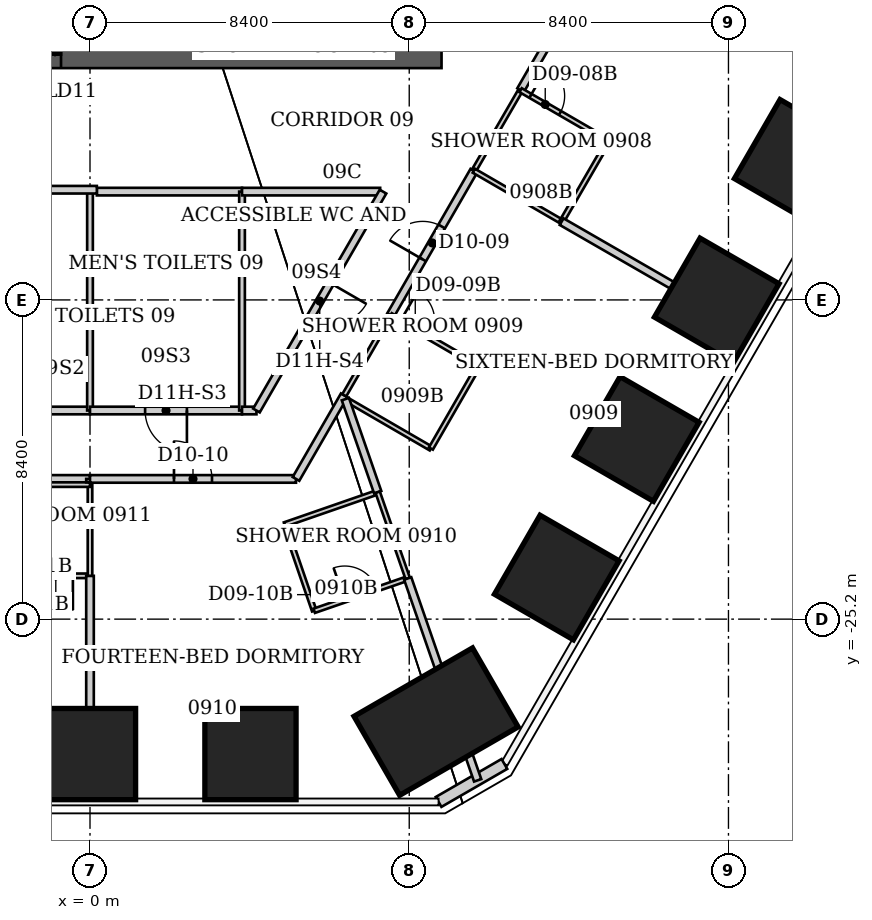
"""IFC4 building model, lengths in metres.
Left out: names, types, materials, properties, quantities, classifications, styles, units other than length and angle.
Written with IfcOpenShell. Run it as: python <this file> out.ifc"""

import sys

from ifc_helpers import new_model, si_unit, direction, frame, frame_2d, origin, origin_2d, place, context, subcontext, project, spatial, rectangle, extrude, element, fill, save


model = new_model("IFC4")
c1 = context("Model", 3, precision=1e-05, world=origin(), true_north=direction((0.0, 1.0)))
c2 = subcontext(c1, "Body", "Model", "MODEL_VIEW")
j1 = project(units=[si_unit("LENGTHUNIT", "METRE"), si_unit("PLANEANGLEUNIT", "RADIAN")], contexts=[c1])
p1 = place(None, origin())
s1 = spatial("IfcSite", under=j1, at=p1, CompositionType="ELEMENT")
p2 = place(p1, origin())
s2 = spatial("IfcBuilding", under=s1, at=p2, CompositionType="ELEMENT")
p3 = place(p2, frame((0.0, 0.0, 42.0)))
s3 = spatial("IfcBuildingStorey", under=s2, at=p3, CompositionType="ELEMENT", Elevation=42.0)
for number, where, z_axis, x_axis in (
    (1, (18.596, -13.167, 0.0), (0.0, 0.0, 1.0), (0.866, -0.5, 0.0)),
    (2, (16.491, -16.813, 0.0), (0.0, 0.0, 1.0), (0.866, -0.5, 0.0)),
    (3, (14.387, -20.459, 0.0), (0.0, 0.0, 1.0), (0.866, -0.5, 0.0)),
    (4, (12.282, -24.105, 0.0), (0.0, 0.0, 1.0), (0.866, -0.5, 0.0)),
):
    element("IfcColumn", number, at=place(p3, frame(where, z_axis=z_axis, x_axis=x_axis)), inside=s3, PredefinedType="COLUMN", context=c2, shape_type="SweptSolid", body=[
        extrude(rectangle(XDim=2.4, YDim=2.4, at=origin_2d()), origin(), (0.0, 0.0, 1.0), 3.8),
    ])
p4 = place(p3, frame((9.106, -27.897, 0.0), z_axis=(0.0, 0.0, 1.0), x_axis=(0.5, -0.866025403784, 0.0)))
e5 = element("IfcColumn", 5, at=p4, inside=s3, PredefinedType="COLUMN", context=c2, shape_type="SweptSolid", body=[
    extrude(rectangle(XDim=2.4, YDim=3.6, at=origin_2d()), origin(), (0.0, 0.0, 1.0), 3.8),
])
for number, where, z_axis, x_axis in (
    (6, (4.222, -28.751, 0.0), (0.0, 0.0, 1.0), (0.0, -1.0, 0.0)),
    (7, (0.0, -28.751, 0.0), (0.0, 0.0, 1.0), (0.0, -1.0, 0.0)),
):
    element("IfcColumn", number, at=place(p3, frame(where, z_axis=z_axis, x_axis=x_axis)), inside=s3, PredefinedType="COLUMN", context=c2, shape_type="SweptSolid", body=[
        extrude(rectangle(XDim=2.4, YDim=2.4, at=origin_2d()), origin(), (0.0, 0.0, 1.0), 3.8),
    ])
p5 = place(p3, frame((-9.25, -9.95, 0.0), z_axis=(0.0, 0.0, 1.0), x_axis=(1.0, 0.0, 0.0)))
e8 = element("IfcWall", 8, at=p5, inside=s3, PredefinedType="SHEAR", context=c2, shape_type="SweptSolid", body=[
    extrude(rectangle(XDim=18.5, YDim=1.5, at=frame_2d((9.25, 0.0))), origin(), (0.0, 0.0, 1.0), 3.8),
])
p6 = place(p5, frame((2.137, 0.0, 0.0)))
e9 = element("IfcOpeningElement", 9, at=p6, cuts=e8, PredefinedType="OPENING", context=c2, shape_type="SweptSolid", body=[
    extrude(rectangle(XDim=1.1, YDim=2.1, at=frame_2d((0.55, 1.05))), frame((0.0, 0.75, 0.0), z_axis=(0.0, -1.0, 0.0), x_axis=(1.0, 0.0, 0.0)), (0.0, 0.0, 1.0), 1.5),
])
p7 = place(p5, frame((4.762, 0.0, 0.0)))
e10 = element("IfcOpeningElement", 10, at=p7, cuts=e8, PredefinedType="OPENING", context=c2, shape_type="SweptSolid", body=[
    extrude(rectangle(XDim=1.1, YDim=2.1, at=frame_2d((0.55, 1.05))), frame((0.0, 0.75, 0.0), z_axis=(0.0, -1.0, 0.0), x_axis=(1.0, 0.0, 0.0)), (0.0, 0.0, 1.0), 1.5),
])
p8 = place(p5, frame((7.387, 0.0, 0.0)))
e11 = element("IfcOpeningElement", 11, at=p8, cuts=e8, PredefinedType="OPENING", context=c2, shape_type="SweptSolid", body=[
    extrude(rectangle(XDim=1.1, YDim=2.1, at=frame_2d((0.55, 1.05))), frame((0.0, 0.75, 0.0), z_axis=(0.0, -1.0, 0.0), x_axis=(1.0, 0.0, 0.0)), (0.0, 0.0, 1.0), 1.5),
])
p9 = place(p3, frame((10.904, -29.011, 0.0), z_axis=(0.0, 0.0, 1.0), x_axis=(-0.866010750942, -0.50002537861, 0.0)))
e12 = element("IfcWall", 12, at=p9, inside=s3, PredefinedType="SOLIDWALL", context=c2, shape_type="SweptSolid", body=[
    extrude(rectangle(XDim=2.0, YDim=0.3, at=frame_2d((1.0, 0.0))), origin(), (0.0, 0.0, 1.0), 3.64),
])
p10 = place(p3, frame((-5.42, -21.51, 0.0), z_axis=(0.0, 0.0, 1.0), x_axis=(1.0, 0.0, 0.0)))
e13 = element("IfcWall", 13, at=p10, inside=s3, PredefinedType="PARTITIONING", context=c2, shape_type="SweptSolid", body=[
    extrude(rectangle(XDim=5.42, YDim=0.2, at=frame_2d((2.71, 0.0))), origin(), (0.0, 0.0, 1.0), 3.64),
])
p11 = place(p10, frame((1.71, 0.0, 0.0)))
e14 = element("IfcOpeningElement", 14, at=p11, cuts=e13, PredefinedType="OPENING", context=c2, shape_type="SweptSolid", body=[
    extrude(rectangle(XDim=1.0, YDim=2.13, at=frame_2d((0.5, 1.065))), frame((0.0, 0.1, 0.0), z_axis=(0.0, -1.0, 0.0), x_axis=(1.0, 0.0, 0.0)), (0.0, 0.0, 1.0), 0.2),
])
p12 = place(p3, frame((-2.6, -24.06, 0.0), z_axis=(0.0, 0.0, 1.0), x_axis=(1.0, 0.0, 0.0)))
e15 = element("IfcWall", 15, at=p12, inside=s3, PredefinedType="PARTITIONING", context=c2, shape_type="SweptSolid", body=[
    extrude(rectangle(XDim=2.6, YDim=0.12, at=frame_2d((1.3, 0.0))), origin(), (0.0, 0.0, 1.0), 3.64),
])
p13 = place(p12, frame((1.25, 0.0, 0.0)))
e16 = element("IfcOpeningElement", 16, at=p13, cuts=e15, PredefinedType="OPENING", context=c2, shape_type="SweptSolid", body=[
    extrude(rectangle(XDim=0.9, YDim=2.03, at=frame_2d((0.45, 1.015))), frame((0.0, 0.06, 0.0), z_axis=(0.0, -1.0, 0.0), x_axis=(1.0, 0.0, 0.0)), (0.0, 0.0, 1.0), 0.12),
])
p14 = place(p3, frame((0.0, -29.89, 0.0), z_axis=(0.0, 0.0, 1.0), x_axis=(0.0, 1.0, 0.0)))
e17 = element("IfcWall", 17, at=p14, inside=s3, PredefinedType="PARTITIONING", context=c2, shape_type="SweptSolid", body=[
    extrude(rectangle(XDim=5.83, YDim=0.2, at=frame_2d((2.915, 0.0))), origin(), (0.0, 0.0, 1.0), 2.86),
])
p15 = place(p3, frame((0.0, -24.06, 0.0), z_axis=(0.0, 0.0, 1.0), x_axis=(0.0, 1.0, 0.0)))
e18 = element("IfcWall", 18, at=p15, inside=s3, PredefinedType="PARTITIONING", context=c2, shape_type="SweptSolid", body=[
    extrude(rectangle(XDim=2.4, YDim=0.12, at=frame_2d((1.2, 0.0))), origin(), (0.0, 0.0, 1.0), 2.86),
])
p16 = place(p3, frame((0.0, -21.66, 0.0), z_axis=(0.0, 0.0, 1.0), x_axis=(-1.0, 0.0, 0.0)))
e19 = element("IfcWall", 19, at=p16, inside=s3, PredefinedType="PARTITIONING", context=c2, shape_type="SweptSolid", body=[
    extrude(rectangle(XDim=2.6, YDim=0.12, at=frame_2d((1.3, 0.0))), origin(), (0.0, 0.0, 1.0), 3.64),
])
p17 = place(p3, frame((0.0, -21.6, 0.0), z_axis=(0.0, 0.0, 1.0), x_axis=(0.0, 1.0, 0.0)))
e20 = element("IfcWall", 20, at=p17, inside=s3, PredefinedType="PARTITIONING", context=c2, shape_type="SweptSolid", body=[
    extrude(rectangle(XDim=0.09, YDim=0.2, at=frame_2d((0.045, 0.0))), origin(), (0.0, 0.0, 1.0), 3.64),
])
p18 = place(p3, frame((0.0, -21.51, 0.0), z_axis=(0.0, 0.0, 1.0), x_axis=(1.0, 0.0, 0.0)))
e21 = element("IfcWall", 21, at=p18, inside=s3, PredefinedType="PARTITIONING", context=c2, shape_type="SweptSolid", body=[
    extrude(rectangle(XDim=5.42, YDim=0.2, at=frame_2d((2.71, 0.0))), origin(), (0.0, 0.0, 1.0), 3.64),
])
p19 = place(p18, frame((2.21, 0.0, 0.0)))
e22 = element("IfcOpeningElement", 22, at=p19, cuts=e21, PredefinedType="OPENING", context=c2, shape_type="SweptSolid", body=[
    extrude(rectangle(XDim=1.0, YDim=2.13, at=frame_2d((0.5, 1.065))), frame((0.0, 0.1, 0.0), z_axis=(0.0, -1.0, 0.0), x_axis=(1.0, 0.0, 0.0)), (0.0, 0.0, 1.0), 0.2),
])
p20 = place(p3, frame((0.0, -19.71, 0.0), z_axis=(0.0, 0.0, 1.0), x_axis=(-1.0, 0.0, 0.0)))
e23 = element("IfcWall", 23, at=p20, inside=s3, PredefinedType="PARTITIONING", context=c2, shape_type="SweptSolid", body=[
    extrude(rectangle(XDim=4.0, YDim=0.2, at=frame_2d((2.0, 0.0))), origin(), (0.0, 0.0, 1.0), 3.64),
])
p21 = place(p3, frame((0.0, -13.95, 0.0), z_axis=(0.0, 0.0, 1.0), x_axis=(0.0, -1.0, 0.0)))
e24 = element("IfcWall", 24, at=p21, inside=s3, PredefinedType="PARTITIONING", context=c2, shape_type="SweptSolid", body=[
    extrude(rectangle(XDim=5.76, YDim=0.15, at=frame_2d((2.88, 0.0))), origin(), (0.0, 0.0, 1.0), 2.86),
])
p22 = place(p3, frame((0.18, -13.95, 0.0), z_axis=(0.0, 0.0, 1.0), x_axis=(1.0, 0.0, 0.0)))
e25 = element("IfcWall", 25, at=p22, inside=s3, PredefinedType="PARTITIONING", context=c2, shape_type="SweptSolid", body=[
    extrude(rectangle(XDim=3.82, YDim=0.2, at=frame_2d((1.91, 0.0))), origin(), (0.0, 0.0, 1.0), 3.64),
])
p23 = place(p3, frame((0.18, -13.9, 0.0), z_axis=(0.0, 0.0, 1.0), x_axis=(-1.0, 0.0, 0.0)))
e26 = element("IfcWall", 26, at=p23, inside=s3, PredefinedType="PARTITIONING", context=c2, shape_type="SweptSolid", body=[
    extrude(rectangle(XDim=7.97, YDim=0.2, at=frame_2d((3.985, 0.0))), origin(), (0.0, 0.0, 1.0), 3.64),
])
p24 = place(p23, frame((3.035, 0.0, 0.0)))
e27 = element("IfcOpeningElement", 27, at=p24, cuts=e26, PredefinedType="OPENING", context=c2, shape_type="SweptSolid", body=[
    extrude(rectangle(XDim=1.1, YDim=2.2, at=frame_2d((0.55, 1.1))), frame((0.0, 0.1, 0.0), z_axis=(0.0, -1.0, 0.0), x_axis=(1.0, 0.0, 0.0)), (0.0, 0.0, 1.0), 0.2),
])
p25 = place(p3, frame((4.0, -19.71, 0.0), z_axis=(0.0, 0.0, 1.0), x_axis=(-1.0, 0.0, 0.0)))
e28 = element("IfcWall", 28, at=p25, inside=s3, PredefinedType="PARTITIONING", context=c2, shape_type="SweptSolid", body=[
    extrude(rectangle(XDim=4.0, YDim=0.2, at=frame_2d((2.0, 0.0))), origin(), (0.0, 0.0, 1.0), 3.64),
])
p26 = place(p25, frame((1.45, 0.0, 0.0)))
e29 = element("IfcOpeningElement", 29, at=p26, cuts=e28, PredefinedType="OPENING", context=c2, shape_type="SweptSolid", body=[
    extrude(rectangle(XDim=1.1, YDim=2.2, at=frame_2d((0.55, 1.1))), frame((0.0, 0.1, 0.0), z_axis=(0.0, -1.0, 0.0), x_axis=(1.0, 0.0, 0.0)), (0.0, 0.0, 1.0), 0.2),
])
p27 = place(p3, frame((4.0, -13.95, 0.0), z_axis=(0.0, 0.0, 1.0), x_axis=(0.0, -1.0, 0.0)))
e30 = element("IfcWall", 30, at=p27, inside=s3, PredefinedType="PARTITIONING", context=c2, shape_type="SweptSolid", body=[
    extrude(rectangle(XDim=5.76, YDim=0.15, at=frame_2d((2.88, 0.0))), origin(), (0.0, 0.0, 1.0), 3.64),
])
p28 = place(p3, frame((4.0, -13.95, 0.0), z_axis=(0.0, 0.0, 1.0), x_axis=(1.0, 0.0, 0.0)))
e31 = element("IfcWall", 31, at=p28, inside=s3, PredefinedType="PARTITIONING", context=c2, shape_type="SweptSolid", body=[
    extrude(rectangle(XDim=3.635, YDim=0.2, at=frame_2d((1.817, 0.0))), origin(), (0.0, 0.0, 1.0), 3.64),
])
p29 = place(p3, frame((4.38, -19.71, 0.0), z_axis=(0.0, 0.0, 1.0), x_axis=(-1.0, 0.0, 0.0)))
e32 = element("IfcWall", 32, at=p29, inside=s3, PredefinedType="PARTITIONING", context=c2, shape_type="SweptSolid", body=[
    extrude(rectangle(XDim=0.38, YDim=0.2, at=frame_2d((0.19, 0.0))), origin(), (0.0, 0.0, 1.0), 3.64),
])
p30 = place(p3, frame((5.12, -22.71, 0.0), z_axis=(0.0, 0.0, 1.0), x_axis=(0.324880771143, -0.945754981241, 0.0)))
e33 = element("IfcWall", 33, at=p30, inside=s3, PredefinedType="PARTITIONING", context=c2, shape_type="SweptSolid", body=[
    extrude(rectangle(XDim=2.4, YDim=0.12, at=frame_2d((1.2, 0.0))), origin(), (0.0, 0.0, 1.0), 3.64),
])
p31 = place(p3, frame((5.42, -21.51, 0.0), z_axis=(0.0, 0.0, 1.0), x_axis=(0.499963722229, 0.866046347752, 0.0)))
e34 = element("IfcWall", 34, at=p31, inside=s3, PredefinedType="PARTITIONING", context=c2, shape_type="SweptSolid", body=[
    extrude(rectangle(XDim=2.54, YDim=0.2, at=frame_2d((1.27, 0.0))), origin(), (0.0, 0.0, 1.0), 3.64),
])
p32 = place(p3, frame((5.9, -24.98, 0.0), z_axis=(0.0, 0.0, 1.0), x_axis=(0.945165466094, 0.326591857987, 0.0)))
e35 = element("IfcWall", 35, at=p32, inside=s3, PredefinedType="PARTITIONING", context=c2, shape_type="SweptSolid", body=[
    extrude(rectangle(XDim=2.603, YDim=0.12, at=frame_2d((1.302, 0.0))), origin(), (0.0, 0.0, 1.0), 3.64),
])
p33 = place(p32, frame((0.85, 0.0, 0.0)))
e36 = element("IfcOpeningElement", 36, at=p33, cuts=e35, PredefinedType="OPENING", context=c2, shape_type="SweptSolid", body=[
    extrude(rectangle(XDim=0.9, YDim=2.03, at=frame_2d((0.45, 1.015))), frame((0.0, 0.06, 0.0), z_axis=(0.0, -1.0, 0.0), x_axis=(1.0, 0.0, 0.0)), (0.0, 0.0, 1.0), 0.12),
])
p34 = place(p3, frame((6.69, -19.31, 0.0), z_axis=(0.0, 0.0, 1.0), x_axis=(0.500522890398, 0.865723302324, 0.0)))
e37 = element("IfcWall", 37, at=p34, inside=s3, PredefinedType="PARTITIONING", context=c2, shape_type="SweptSolid", body=[
    extrude(rectangle(XDim=2.438, YDim=0.12, at=frame_2d((1.219, 0.0))), origin(), (0.0, 0.0, 1.0), 3.64),
])
p35 = place(p3, frame((6.808, -19.455, 0.0), z_axis=(0.0, 0.0, 1.0), x_axis=(0.864881956308, -0.501975299844, 0.0)))
e38 = element("IfcWall", 38, at=p35, inside=s3, PredefinedType="PARTITIONING", context=c2, shape_type="SweptSolid", body=[
    extrude(rectangle(XDim=2.5, YDim=0.12, at=frame_2d((1.25, 0.0))), origin(), (0.0, 0.0, 1.0), 3.64),
])
p36 = place(p3, frame((7.57, -21.86, 0.0), z_axis=(0.0, 0.0, 1.0), x_axis=(-0.944782191137, -0.327698964463, 0.0)))
e39 = element("IfcWall", 39, at=p36, inside=s3, PredefinedType="PARTITIONING", context=c2, shape_type="SweptSolid", body=[
    extrude(rectangle(XDim=2.594, YDim=0.12, at=frame_2d((1.297, 0.0))), origin(), (0.0, 0.0, 1.0), 3.64),
])
p37 = place(p3, frame((7.57, -21.86, 0.0), z_axis=(0.0, 0.0, 1.0), x_axis=(-0.327782990589, 0.944753042377, 0.0)))
e40 = element("IfcWall", 40, at=p37, inside=s3, PredefinedType="PARTITIONING", context=c2, shape_type="SweptSolid", body=[
    extrude(rectangle(XDim=2.594, YDim=0.2, at=frame_2d((1.297, 0.0))), origin(), (0.0, 0.0, 1.0), 3.64),
])
p38 = place(p3, frame((7.57, -21.86, 0.0), z_axis=(0.0, 0.0, 1.0), x_axis=(0.328725498061, -0.944425511581, 0.0)))
e41 = element("IfcWall", 41, at=p38, inside=s3, PredefinedType="PARTITIONING", context=c2, shape_type="SweptSolid", body=[
    extrude(rectangle(XDim=2.403, YDim=0.12, at=frame_2d((1.202, 0.0))), origin(), (0.0, 0.0, 1.0), 3.64),
])
p39 = place(p3, frame((7.71, -13.95, 0.0), z_axis=(0.0, 0.0, 1.0), x_axis=(-0.500511113963, -0.865730110831, 0.0)))
e42 = element("IfcWall", 42, at=p39, inside=s3, PredefinedType="PARTITIONING", context=c2, shape_type="SweptSolid", body=[
    extrude(rectangle(XDim=6.653, YDim=0.2, at=frame_2d((3.327, 0.0))), origin(), (0.0, 0.0, 1.0), 3.64),
])
p40 = place(p39, frame((2.777, 0.0, 0.0)))
e43 = element("IfcOpeningElement", 43, at=p40, cuts=e42, PredefinedType="OPENING", context=c2, shape_type="SweptSolid", body=[
    extrude(rectangle(XDim=1.1, YDim=2.2, at=frame_2d((0.55, 1.1))), frame((0.0, 0.1, 0.0), z_axis=(0.0, -1.0, 0.0), x_axis=(1.0, 0.0, 0.0)), (0.0, 0.0, 1.0), 0.2),
])
p41 = place(p3, frame((7.909, -17.199, 0.0), z_axis=(0.0, 0.0, 1.0), x_axis=(0.499528080516, 0.866297695239, 0.0)))
e44 = element("IfcWall", 44, at=p41, inside=s3, PredefinedType="PARTITIONING", context=c2, shape_type="SweptSolid", body=[
    extrude(rectangle(XDim=4.386, YDim=0.2, at=frame_2d((2.193, 0.0))), origin(), (0.0, 0.0, 1.0), 3.64),
])
p42 = place(p41, frame((1.693, 0.0, 0.0)))
e45 = element("IfcOpeningElement", 45, at=p42, cuts=e44, PredefinedType="OPENING", context=c2, shape_type="SweptSolid", body=[
    extrude(rectangle(XDim=1.0, YDim=2.13, at=frame_2d((0.5, 1.065))), frame((0.0, 0.1, 0.0), z_axis=(0.0, -1.0, 0.0), x_axis=(1.0, 0.0, 0.0)), (0.0, 0.0, 1.0), 0.2),
])
p43 = place(p3, frame((8.36, -24.13, 0.0), z_axis=(0.0, 0.0, 1.0), x_axis=(0.327332811485, -0.944909112309, 0.0)))
e46 = element("IfcWall", 46, at=p43, inside=s3, PredefinedType="PARTITIONING", context=c2, shape_type="SweptSolid", body=[
    extrude(rectangle(XDim=5.621, YDim=0.2, at=frame_2d((2.811, 0.0))), origin(), (0.0, 0.0, 1.0), 3.64),
])
p44 = place(p3, frame((8.97, -20.71, 0.0), z_axis=(0.0, 0.0, 1.0), x_axis=(0.499159685399, 0.866510016372, 0.0)))
e47 = element("IfcWall", 47, at=p44, inside=s3, PredefinedType="PARTITIONING", context=c2, shape_type="SweptSolid", body=[
    extrude(rectangle(XDim=2.504, YDim=0.12, at=frame_2d((1.252, 0.0))), origin(), (0.0, 0.0, 1.0), 3.64),
])
p45 = place(p3, frame((10.1, -13.4, 0.0), z_axis=(0.0, 0.0, 1.0), x_axis=(0.501856726365, 0.86495076519, 0.0)))
e48 = element("IfcWall", 48, at=p45, inside=s3, PredefinedType="PARTITIONING", context=c2, shape_type="SweptSolid", body=[
    extrude(rectangle(XDim=2.451, YDim=0.12, at=frame_2d((1.226, 0.0))), origin(), (0.0, 0.0, 1.0), 3.64),
])
p46 = place(p3, frame((10.1, -13.4, 0.0), z_axis=(0.0, 0.0, 1.0), x_axis=(0.864966903181, -0.501828911485, 0.0)))
e49 = element("IfcWall", 49, at=p46, inside=s3, PredefinedType="PARTITIONING", context=c2, shape_type="SweptSolid", body=[
    extrude(rectangle(XDim=2.67, YDim=0.12, at=frame_2d((1.335, 0.0))), origin(), (0.0, 0.0, 1.0), 3.64),
])
p47 = place(p3, frame((10.22, -18.54, 0.0), z_axis=(0.0, 0.0, 1.0), x_axis=(-0.86498992408, 0.501789229896, 0.0)))
e50 = element("IfcWall", 50, at=p47, inside=s3, PredefinedType="PARTITIONING", context=c2, shape_type="SweptSolid", body=[
    extrude(rectangle(XDim=2.671, YDim=0.12, at=frame_2d((1.335, 0.0))), origin(), (0.0, 0.0, 1.0), 3.64),
])
p48 = place(p47, frame((1.47, 0.0, 0.0)))
e51 = element("IfcOpeningElement", 51, at=p48, cuts=e50, PredefinedType="OPENING", context=c2, shape_type="SweptSolid", body=[
    extrude(rectangle(XDim=0.9, YDim=2.03, at=frame_2d((0.45, 1.015))), frame((0.0, 0.06, 0.0), z_axis=(0.0, -1.0, 0.0), x_axis=(1.0, 0.0, 0.0)), (0.0, 0.0, 1.0), 0.12),
])
p49 = place(p3, frame((11.33, -11.28, 0.0), z_axis=(0.0, 0.0, 1.0), x_axis=(0.50006348966, 0.865988744909, 0.0)))
e52 = element("IfcWall", 52, at=p49, inside=s3, PredefinedType="PARTITIONING", context=c2, shape_type="SweptSolid", body=[
    extrude(rectangle(XDim=10.658, YDim=0.2, at=frame_2d((5.329, 0.0))), origin(), (0.0, 0.0, 1.0), 3.64),
])
p50 = place(p49, frame((4.829, 0.0, 0.0)))
e53 = element("IfcOpeningElement", 53, at=p50, cuts=e52, PredefinedType="OPENING", context=c2, shape_type="SweptSolid", body=[
    extrude(rectangle(XDim=1.0, YDim=2.13, at=frame_2d((0.5, 1.065))), frame((0.0, 0.1, 0.0), z_axis=(0.0, -1.0, 0.0), x_axis=(1.0, 0.0, 0.0)), (0.0, 0.0, 1.0), 0.2),
])
p51 = place(p3, frame((12.41, -14.74, 0.0), z_axis=(0.0, 0.0, 1.0), x_axis=(0.501813488763, 0.864975850817, 0.0)))
e54 = element("IfcWall", 54, at=p51, inside=s3, PredefinedType="PARTITIONING", context=c2, shape_type="SweptSolid", body=[
    extrude(rectangle(XDim=2.451, YDim=0.12, at=frame_2d((1.226, 0.0))), origin(), (0.0, 0.0, 1.0), 3.64),
])
p52 = place(p3, frame((13.64, -12.62, 0.0), z_axis=(0.0, 0.0, 1.0), x_axis=(-0.864966903181, 0.501828911485, 0.0)))
e55 = element("IfcWall", 55, at=p52, inside=s3, PredefinedType="PARTITIONING", context=c2, shape_type="SweptSolid", body=[
    extrude(rectangle(XDim=2.67, YDim=0.12, at=frame_2d((1.335, 0.0))), origin(), (0.0, 0.0, 1.0), 3.64),
])
p53 = place(p52, frame((1.47, 0.0, 0.0)))
e56 = element("IfcOpeningElement", 56, at=p53, cuts=e55, PredefinedType="OPENING", context=c2, shape_type="SweptSolid", body=[
    extrude(rectangle(XDim=0.9, YDim=2.03, at=frame_2d((0.45, 1.015))), frame((0.0, 0.06, 0.0), z_axis=(0.0, -1.0, 0.0), x_axis=(1.0, 0.0, 0.0)), (0.0, 0.0, 1.0), 0.12),
])
p54 = place(p3, frame((17.356, -17.59, 0.0), z_axis=(0.0, 0.0, 1.0), x_axis=(-0.866442508333, 0.499276856818, 0.0)))
e57 = element("IfcWall", 57, at=p54, inside=s3, PredefinedType="PARTITIONING", context=c2, shape_type="SweptSolid", body=[
    extrude(rectangle(XDim=5.708, YDim=0.2, at=frame_2d((2.854, 0.0))), origin(), (0.0, 0.0, 1.0), 3.64),
])
p55 = place(p53, origin())
e58 = element("IfcDoor", 58, at=p55, inside=s3, OperationType="SINGLE_SWING_RIGHT", PredefinedType="DOOR", context=c2, shape_type="SweptSolid", body=[
    extrude(rectangle(XDim=0.9, YDim=2.03, at=frame_2d((0.45, 1.015))), frame((0.0, 0.025, 0.0), z_axis=(0.0, -1.0, 0.0), x_axis=(1.0, 0.0, 0.0)), (0.0, 0.0, 1.0), 0.05),
])
fill(e56, e58)
p56 = place(p42, origin())
e59 = element("IfcDoor", 59, at=p56, inside=s3, OperationType="SINGLE_SWING_LEFT", PredefinedType="DOOR", context=c2, shape_type="SweptSolid", body=[
    extrude(rectangle(XDim=1.0, YDim=2.13, at=frame_2d((0.5, 1.065))), frame((0.0, 0.025, 0.0), z_axis=(0.0, -1.0, 0.0), x_axis=(1.0, 0.0, 0.0)), (0.0, 0.0, 1.0), 0.05),
])
fill(e45, e59)
p57 = place(p48, origin())
e60 = element("IfcDoor", 60, at=p57, inside=s3, OperationType="SINGLE_SWING_RIGHT", PredefinedType="DOOR", context=c2, shape_type="SweptSolid", body=[
    extrude(rectangle(XDim=0.9, YDim=2.03, at=frame_2d((0.45, 1.015))), frame((0.0, 0.025, 0.0), z_axis=(0.0, -1.0, 0.0), x_axis=(1.0, 0.0, 0.0)), (0.0, 0.0, 1.0), 0.05),
])
fill(e51, e60)
p58 = place(p19, origin())
e61 = element("IfcDoor", 61, at=p58, inside=s3, OperationType="SINGLE_SWING_LEFT", PredefinedType="DOOR", context=c2, shape_type="SweptSolid", body=[
    extrude(rectangle(XDim=1.0, YDim=2.13, at=frame_2d((0.5, 1.065))), frame((0.0, 0.025, 0.0), z_axis=(0.0, -1.0, 0.0), x_axis=(1.0, 0.0, 0.0)), (0.0, 0.0, 1.0), 0.05),
])
fill(e22, e61)
p59 = place(p33, origin())
e62 = element("IfcDoor", 62, at=p59, inside=s3, OperationType="SINGLE_SWING_LEFT", PredefinedType="DOOR", context=c2, shape_type="SweptSolid", body=[
    extrude(rectangle(XDim=0.9, YDim=2.03, at=frame_2d((0.45, 1.015))), frame((0.0, 0.025, 0.0), z_axis=(0.0, -1.0, 0.0), x_axis=(1.0, 0.0, 0.0)), (0.0, 0.0, 1.0), 0.05),
])
fill(e36, e62)
p60 = place(p13, origin())
e63 = element("IfcDoor", 63, at=p60, inside=s3, OperationType="SINGLE_SWING_RIGHT", PredefinedType="DOOR", context=c2, shape_type="SweptSolid", body=[
    extrude(rectangle(XDim=0.9, YDim=2.03, at=frame_2d((0.45, 1.015))), frame((0.0, 0.025, 0.0), z_axis=(0.0, -1.0, 0.0), x_axis=(1.0, 0.0, 0.0)), (0.0, 0.0, 1.0), 0.05),
])
fill(e16, e63)
p61 = place(p26, origin())
e64 = element("IfcDoor", 64, at=p61, inside=s3, OperationType="SINGLE_SWING_LEFT", PredefinedType="DOOR", context=c2, shape_type="SweptSolid", body=[
    extrude(rectangle(XDim=1.1, YDim=2.2, at=frame_2d((0.55, 1.1))), frame((0.0, 0.025, 0.0), z_axis=(0.0, -1.0, 0.0), x_axis=(1.0, 0.0, 0.0)), (0.0, 0.0, 1.0), 0.05),
])
fill(e29, e64)
p62 = place(p40, origin())
e65 = element("IfcDoor", 65, at=p62, inside=s3, OperationType="SINGLE_SWING_LEFT", PredefinedType="DOOR", context=c2, shape_type="SweptSolid", body=[
    extrude(rectangle(XDim=1.1, YDim=2.2, at=frame_2d((0.55, 1.1))), frame((0.0, 0.025, 0.0), z_axis=(0.0, -1.0, 0.0), x_axis=(1.0, 0.0, 0.0)), (0.0, 0.0, 1.0), 0.05),
])
fill(e43, e65)
save(model, sys.argv[1])
